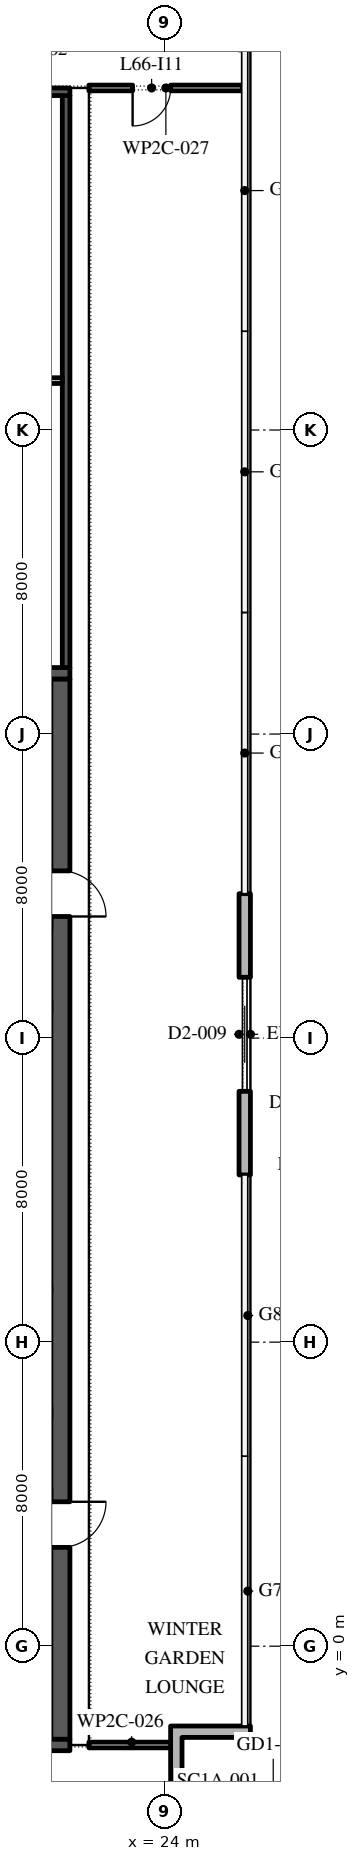
"""IFC4 building model, lengths in metres.
Left out: names, types, materials, properties, quantities, classifications, styles, units other than length and angle.
Written with IfcOpenShell. Run it as: python <this file> out.ifc"""

import sys

from ifc_helpers import new_model, si_unit, direction, frame, frame_2d, origin, place, context, subcontext, project, spatial, polyline, rectangle, outline, extrude, element, fill, save


model = new_model("IFC4")
c1 = context("Model", 3, precision=1e-05, world=origin(), true_north=direction((0.0, 1.0)))
c2 = subcontext(c1, "Body", "Model", "MODEL_VIEW")
j1 = project(units=[si_unit("LENGTHUNIT", "METRE"), si_unit("PLANEANGLEUNIT", "RADIAN")], contexts=[c1])
p1 = place(None, origin())
s1 = spatial("IfcSite", under=j1, at=p1, CompositionType="ELEMENT")
p2 = place(p1, origin())
s2 = spatial("IfcBuilding", under=s1, at=p2, CompositionType="ELEMENT")
p3 = place(p2, frame((0.0, 0.0, 303.0)))
s3 = spatial("IfcBuildingStorey", under=s2, at=p3, CompositionType="ELEMENT", Elevation=303.0)
p4 = place(p3, frame((26.1, 12.4, 0.0), z_axis=(0.0, 0.0, 1.0), x_axis=(0.0, 1.0, 0.0)))
e1 = element("IfcWall", 1, at=p4, inside=s3, PredefinedType="STANDARD", context=c2, shape_type="SweptSolid", body=[
    extrude(rectangle(XDim=7.4, YDim=0.3, at=frame_2d((3.7, 0.0))), origin(), (0.0, 0.0, 1.0), 5.8),
])
p5 = place(p4, frame((2.2, 0.0, 0.0)))
e2 = element("IfcOpeningElement", 2, at=p5, cuts=e1, PredefinedType="OPENING", context=c2, shape_type="SweptSolid", body=[
    extrude(rectangle(XDim=3.0, YDim=3.5, at=frame_2d((1.5, 1.75))), frame((0.0, 0.16, 0.0), z_axis=(0.0, -1.0, 0.0), x_axis=(1.0, 0.0, 0.0)), (0.0, 0.0, 1.0), 0.32),
])
p6 = place(p3, origin())
e3 = element("IfcWall", 3, at=p6, inside=s3, PredefinedType="STANDARD", context=c2, shape_type="SweptSolid", body=[
    extrude(outline(polyline([(24.15, -3.9), (24.15, -2.1), (26.25, -2.1), (26.25, -2.4), (24.45, -2.4), (24.45, -4.2), (22.65, -4.2), (22.65, -5.7), (22.35, -5.7), (22.35, -3.9), (24.15, -3.9)])), origin(), (0.0, 0.0, 1.0), 5.8),
])
p7 = place(p3, frame((21.25, -2.45, 0.0), z_axis=(0.0, 0.0, 1.0), x_axis=(0.0, 1.0, 0.0)))
e4 = element("IfcWall", 4, at=p7, inside=s3, PredefinedType="SHEAR", context=c2, shape_type="SweptSolid", body=[
    extrude(rectangle(XDim=27.9, YDim=0.5, at=frame_2d((13.95, 0.0))), origin(), (0.0, 0.0, 1.0), 5.8),
])
p8 = place(p7, frame((5.05, 0.0, 0.0)))
e5 = element("IfcOpeningElement", 5, at=p8, cuts=e4, PredefinedType="OPENING", context=c2, shape_type="SweptSolid", body=[
    extrude(rectangle(XDim=1.2, YDim=2.1, at=frame_2d((0.6, 1.05))), frame((0.0, 0.26, 0.0), z_axis=(0.0, -1.0, 0.0), x_axis=(1.0, 0.0, 0.0)), (0.0, 0.0, 1.0), 0.52),
])
p9 = place(p7, frame((21.65, 0.0, 0.0)))
e6 = element("IfcOpeningElement", 6, at=p9, cuts=e4, PredefinedType="OPENING", context=c2, shape_type="SweptSolid", body=[
    extrude(rectangle(XDim=1.2, YDim=2.1, at=frame_2d((0.6, 1.05))), frame((0.0, 0.26, 0.0), z_axis=(0.0, -1.0, 0.0), x_axis=(1.0, 0.0, 0.0)), (0.0, 0.0, 1.0), 0.52),
])
for number, where, z_axis, x_axis in (
    (7, (10.5, -2.6, 0.0), (0.0, 0.0, 1.0), (1.0, 0.0, 0.0)),
    (8, (10.5, 25.6, 0.0), (0.0, 0.0, 1.0), (1.0, 0.0, 0.0)),
):
    element("IfcWall", number, at=place(p3, frame(where, z_axis=z_axis, x_axis=x_axis)), inside=s3, PredefinedType="SHEAR", context=c2, shape_type="SweptSolid", body=[
        extrude(rectangle(XDim=11.0, YDim=0.3, at=frame_2d((5.5, 0.0))), origin(), (0.0, 0.0, 1.0), 5.8),
    ])
p10 = place(p3, frame((21.4, 25.75, 0.0), z_axis=(0.0, 0.0, 1.0), x_axis=(0.0, 1.0, 0.0)))
e9 = element("IfcWall", 9, at=p10, inside=s3, PredefinedType="SHEAR", context=c2, shape_type="SweptSolid", body=[
    extrude(rectangle(XDim=15.05, YDim=0.2, at=frame_2d((7.525, 0.0))), origin(), (0.0, 0.0, 1.0), 5.8),
])
p11 = place(p3, frame((10.5, 40.9, 0.0), z_axis=(0.0, 0.0, 1.0), x_axis=(1.0, 0.0, 0.0)))
e10 = element("IfcWall", 10, at=p11, inside=s3, PredefinedType="SHEAR", context=c2, shape_type="SweptSolid", body=[
    extrude(rectangle(XDim=11.0, YDim=0.2, at=frame_2d((5.5, 0.0))), origin(), (0.0, 0.0, 1.0), 5.8),
])
p12 = place(p3, frame((10.7, 33.3, 0.0), z_axis=(0.0, 0.0, 1.0), x_axis=(1.0, 0.0, 0.0)))
e11 = element("IfcWall", 11, at=p12, inside=s3, PredefinedType="PARTITIONING", context=c2, shape_type="SweptSolid", body=[
    extrude(rectangle(XDim=10.6, YDim=0.15, at=frame_2d((5.3, 0.0))), origin(), (0.0, 0.0, 1.0), 5.8),
])
p13 = place(p3, frame((22.0, -2.6, 0.0), z_axis=(0.0, 0.0, 1.0), x_axis=(1.0, 0.0, 0.0)))
e12 = element("IfcWall", 12, at=p13, inside=s3, PredefinedType="PARTITIONING", context=c2, shape_type="SweptSolid", body=[
    extrude(rectangle(XDim=2.25, YDim=0.15, at=frame_2d((1.125, 0.0))), origin(), (0.0, 0.0, 1.0), 5.8),
])
p14 = place(p3, frame((26.05, 41.0, 0.0), z_axis=(0.0, 0.0, 1.0), x_axis=(-1.0, 0.0, 0.0)))
e13 = element("IfcWall", 13, at=p14, inside=s3, PredefinedType="PARTITIONING", context=c2, shape_type="SweptSolid", body=[
    extrude(rectangle(XDim=4.05, YDim=0.15, at=frame_2d((2.025, 0.0))), origin(), (0.0, 0.0, 1.0), 5.8),
])
p15 = place(p14, frame((1.9, 0.0, 0.0)))
e14 = element("IfcOpeningElement", 14, at=p15, cuts=e13, PredefinedType="OPENING", context=c2, shape_type="SweptSolid", body=[
    extrude(rectangle(XDim=1.0, YDim=2.1, at=frame_2d((0.5, 1.05))), frame((0.0, 0.085, 0.0), z_axis=(0.0, -1.0, 0.0), x_axis=(1.0, 0.0, 0.0)), (0.0, 0.0, 1.0), 0.17),
])
p16 = place(p5, origin())
e15 = element("IfcDoor", 15, at=p16, inside=s3, OperationType="DOUBLE_DOOR_SLIDING", PredefinedType="DOOR", context=c2, shape_type="SweptSolid", body=[
    extrude(rectangle(XDim=3.0, YDim=3.5, at=frame_2d((1.5, 1.75))), frame((0.0, 0.025, 0.0), z_axis=(0.0, -1.0, 0.0), x_axis=(1.0, 0.0, 0.0)), (0.0, 0.0, 1.0), 0.05),
])
fill(e2, e15)
p17 = place(p8, frame((1.2, 0.0, 0.0), z_axis=(0.0, 0.0, 1.0), x_axis=(-1.0, 0.0, 0.0)))
e16 = element("IfcDoor", 16, at=p17, inside=s3, OperationType="SINGLE_SWING_RIGHT", PredefinedType="DOOR", context=c2, shape_type="SweptSolid", body=[
    extrude(rectangle(XDim=1.2, YDim=2.1, at=frame_2d((0.6, 1.05))), frame((0.0, 0.025, 0.0), z_axis=(0.0, -1.0, 0.0), x_axis=(1.0, 0.0, 0.0)), (0.0, 0.0, 1.0), 0.05),
])
fill(e5, e16)
p18 = place(p9, frame((1.2, 0.0, 0.0), z_axis=(0.0, 0.0, 1.0), x_axis=(-1.0, 0.0, 0.0)))
e17 = element("IfcDoor", 17, at=p18, inside=s3, OperationType="SINGLE_SWING_LEFT", PredefinedType="DOOR", context=c2, shape_type="SweptSolid", body=[
    extrude(rectangle(XDim=1.2, YDim=2.1, at=frame_2d((0.6, 1.05))), frame((0.0, 0.025, 0.0), z_axis=(0.0, -1.0, 0.0), x_axis=(1.0, 0.0, 0.0)), (0.0, 0.0, 1.0), 0.05),
])
fill(e6, e17)
p19 = place(p15, origin())
e18 = element("IfcDoor", 18, at=p19, inside=s3, OperationType="SINGLE_SWING_LEFT", PredefinedType="DOOR", context=c2, shape_type="SweptSolid", body=[
    extrude(rectangle(XDim=1.0, YDim=2.1, at=frame_2d((0.5, 1.05))), frame((0.0, 0.025, 0.0), z_axis=(0.0, -1.0, 0.0), x_axis=(1.0, 0.0, 0.0)), (0.0, 0.0, 1.0), 0.05),
])
fill(e14, e18)
save(model, sys.argv[1])
